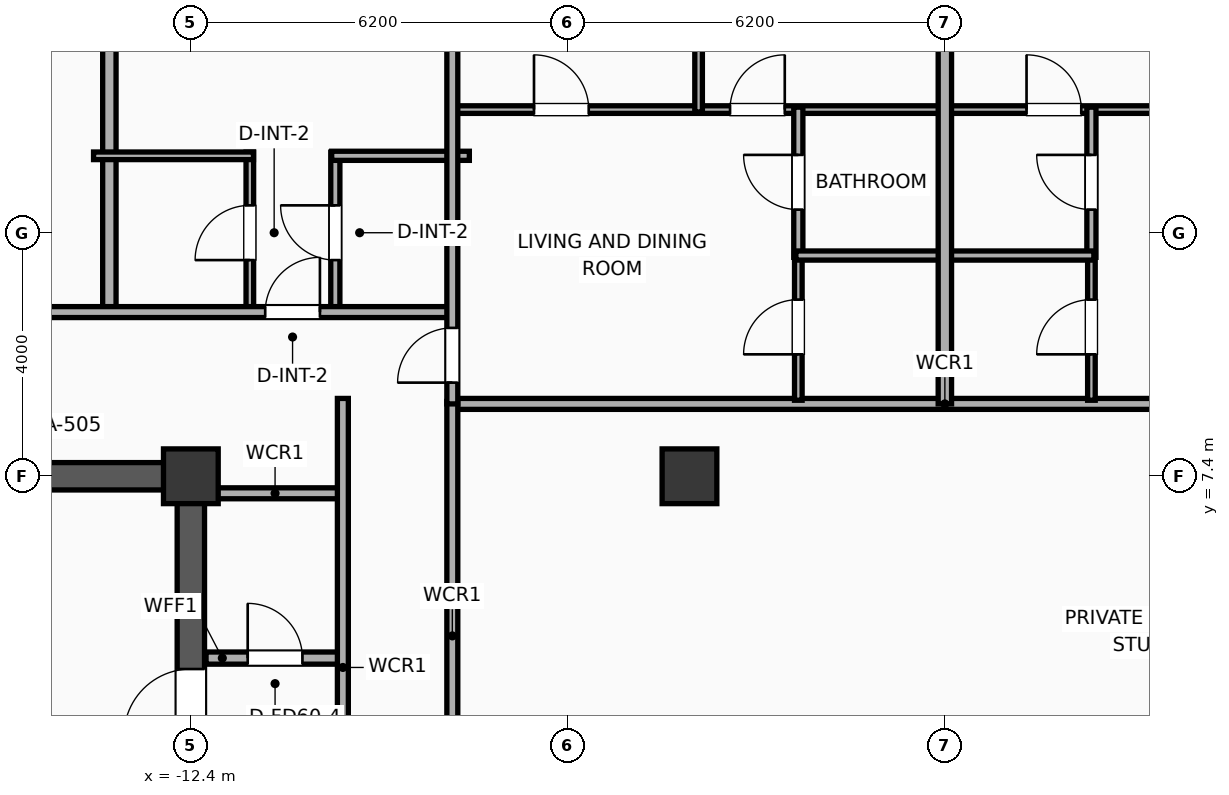
"""IFC4 building model, lengths in metres.
Left out: names, types, materials, properties, quantities, classifications, styles, units other than length and angle.
Written with IfcOpenShell. Run it as: python <this file> out.ifc"""

import sys

from ifc_helpers import new_model, si_unit, direction, frame, frame_2d, origin, origin_2d, place, context, subcontext, project, spatial, rectangle, extrude, element, fill, save


model = new_model("IFC4")
c1 = context("Model", 3, precision=1e-05, world=origin(), true_north=direction((0.0, 1.0)))
c2 = subcontext(c1, "Body", "Model", "MODEL_VIEW")
j1 = project(units=[si_unit("LENGTHUNIT", "METRE"), si_unit("PLANEANGLEUNIT", "RADIAN")], contexts=[c1])
p1 = place(None, origin())
s1 = spatial("IfcSite", under=j1, at=p1, CompositionType="ELEMENT")
p2 = place(p1, origin())
s2 = spatial("IfcBuilding", under=s1, at=p2, CompositionType="ELEMENT")
p3 = place(p2, frame((0.0, 0.0, 144.3)))
s3 = spatial("IfcBuildingStorey", under=s2, at=p3, CompositionType="ELEMENT", Elevation=144.3)
p4 = place(p3, frame((-12.4, 7.4, 0.0), z_axis=(0.0, 0.0, 1.0), x_axis=(1.0, 0.0, 0.0)))
e1 = element("IfcColumn", 1, at=p4, inside=s3, PredefinedType="COLUMN", context=c2, shape_type="SweptSolid", body=[
    extrude(rectangle(XDim=0.9, YDim=0.9, at=origin_2d()), origin(), (0.0, 0.0, 1.0), 3.9),
])
p5 = place(p3, frame((-19.425, 7.4, 0.0), z_axis=(0.0, 0.0, 1.0), x_axis=(1.0, 0.0, 0.0)))
e2 = element("IfcWall", 2, at=p5, inside=s3, PredefinedType="SHEAR", context=c2, shape_type="SweptSolid", body=[
    extrude(rectangle(XDim=7.25, YDim=0.45, at=frame_2d((3.625, 0.0))), origin(), (0.0, 0.0, 1.0), 3.65),
])
p6 = place(p3, frame((-12.4, -7.4, 0.0), z_axis=(0.0, 0.0, 1.0), x_axis=(0.0, 1.0, 0.0)))
e3 = element("IfcWall", 3, at=p6, inside=s3, PredefinedType="SHEAR", context=c2, shape_type="SweptSolid", body=[
    extrude(rectangle(XDim=14.8, YDim=0.45, at=frame_2d((7.4, 0.0))), origin(), (0.0, 0.0, 1.0), 3.65),
])
p7 = place(p6, frame((6.05, 0.0, 0.0)))
e4 = element("IfcOpeningElement", 4, at=p7, cuts=e3, PredefinedType="OPENING", context=c2, shape_type="SweptSolid", body=[
    extrude(rectangle(XDim=1.1, YDim=2.05, at=frame_2d((0.55, 1.025))), frame((0.0, 0.235, 0.0), z_axis=(0.0, -1.0, 0.0), x_axis=(1.0, 0.0, 0.0)), (0.0, 0.0, 1.0), 0.47),
])
p8 = place(p6, frame((10.53, 0.0, 0.0)))
e5 = element("IfcOpeningElement", 5, at=p8, cuts=e3, PredefinedType="OPENING", context=c2, shape_type="SweptSolid", body=[
    extrude(rectangle(XDim=1.1, YDim=2.05, at=frame_2d((0.55, 1.025))), frame((0.0, 0.235, 0.0), z_axis=(0.0, -1.0, 0.0), x_axis=(1.0, 0.0, 0.0)), (0.0, 0.0, 1.0), 0.47),
])
p9 = place(p6, frame((0.85, 0.0, 0.0)))
e6 = element("IfcOpeningElement", 6, at=p9, cuts=e3, PredefinedType="OPENING", context=c2, shape_type="SweptSolid", body=[
    extrude(rectangle(XDim=0.9, YDim=2.05, at=frame_2d((0.45, 1.025))), frame((0.0, 0.235, 0.0), z_axis=(0.0, -1.0, 0.0), x_axis=(1.0, 0.0, 0.0)), (0.0, 0.0, 1.0), 0.47),
])
p10 = place(p6, frame((3.4, 0.0, 0.0)))
e7 = element("IfcOpeningElement", 7, at=p10, cuts=e3, PredefinedType="OPENING", context=c2, shape_type="SweptSolid", body=[
    extrude(rectangle(XDim=0.9, YDim=2.05, at=frame_2d((0.45, 1.025))), frame((0.0, 0.235, 0.0), z_axis=(0.0, -1.0, 0.0), x_axis=(1.0, 0.0, 0.0)), (0.0, 0.0, 1.0), 0.47),
])
p11 = place(p3, frame((-4.2, 7.4, 0.0), z_axis=(0.0, 0.0, 1.0), x_axis=(1.0, 0.0, 0.0)))
e8 = element("IfcColumn", 8, at=p11, inside=s3, PredefinedType="COLUMN", context=c2, shape_type="SweptSolid", body=[
    extrude(rectangle(XDim=0.9, YDim=0.9, at=origin_2d()), origin(), (0.0, 0.0, 1.0), 3.9),
])
p12 = place(p3, frame((-12.15, 4.41, 0.0), z_axis=(0.0, 0.0, 1.0), x_axis=(1.0, 0.0, 0.0)))
e9 = element("IfcWall", 9, at=p12, inside=s3, PredefinedType="PARTITIONING", context=c2, shape_type="SweptSolid", body=[
    extrude(rectangle(XDim=2.27, YDim=0.2, at=frame_2d((1.135, 0.0))), origin(), (0.0, 0.0, 1.0), 3.65),
])
p13 = place(p12, frame((0.685, 0.0, 0.0)))
e10 = element("IfcOpeningElement", 10, at=p13, cuts=e9, PredefinedType="OPENING", context=c2, shape_type="SweptSolid", body=[
    extrude(rectangle(XDim=0.9, YDim=2.05, at=frame_2d((0.45, 1.025))), frame((0.0, 0.11, 0.0), z_axis=(0.0, -1.0, 0.0), x_axis=(1.0, 0.0, 0.0)), (0.0, 0.0, 1.0), 0.22),
])
p14 = place(p3, frame((-12.15, 7.12, 0.0), z_axis=(0.0, 0.0, 1.0), x_axis=(1.0, 0.0, 0.0)))
e11 = element("IfcWall", 11, at=p14, inside=s3, PredefinedType="PARTITIONING", context=c2, shape_type="SweptSolid", body=[
    extrude(rectangle(XDim=2.27, YDim=0.18, at=frame_2d((1.135, 0.0))), origin(), (0.0, 0.0, 1.0), 3.65),
])
p15 = place(p3, frame((-9.9, -8.68, 0.0), z_axis=(0.0, 0.0, 1.0), x_axis=(0.0, 1.0, 0.0)))
e12 = element("IfcWall", 12, at=p15, inside=s3, PredefinedType="PARTITIONING", context=c2, shape_type="SweptSolid", body=[
    extrude(rectangle(XDim=17.36, YDim=0.18, at=frame_2d((8.68, 0.0))), origin(), (0.0, 0.0, 1.0), 3.65),
])
p16 = place(p15, frame((7.262, 0.0, 0.0)))
e13 = element("IfcOpeningElement", 13, at=p16, cuts=e12, PredefinedType="OPENING", context=c2, shape_type="SweptSolid", body=[
    extrude(rectangle(XDim=1.1, YDim=2.05, at=frame_2d((0.55, 1.025))), frame((0.0, 0.1, 0.0), z_axis=(0.0, -1.0, 0.0), x_axis=(1.0, 0.0, 0.0)), (0.0, 0.0, 1.0), 0.2),
])
p17 = place(p3, frame((-8.15, 8.59, 0.0), z_axis=(0.0, 0.0, 1.0), x_axis=(1.0, 0.0, 0.0)))
e14 = element("IfcWall", 14, at=p17, inside=s3, PredefinedType="PARTITIONING", context=c2, shape_type="SweptSolid", body=[
    extrude(rectangle(XDim=16.3, YDim=0.18, at=frame_2d((8.15, 0.0))), origin(), (0.0, 0.0, 1.0), 3.65),
])
p18 = place(p3, frame((-8.1, 0.92, 0.0), z_axis=(0.0, 0.0, 1.0), x_axis=(0.0, 1.0, 0.0)))
e15 = element("IfcWall", 15, at=p18, inside=s3, PredefinedType="PARTITIONING", context=c2, shape_type="SweptSolid", body=[
    extrude(rectangle(XDim=7.71, YDim=0.18, at=frame_2d((3.855, 0.0))), origin(), (0.0, 0.0, 1.0), 3.65),
])
p19 = place(p3, frame((-13.74, 10.02, 0.0), z_axis=(0.0, 0.0, 1.0), x_axis=(0.0, 1.0, 0.0)))
e16 = element("IfcWall", 16, at=p19, inside=s3, PredefinedType="PARTITIONING", context=c2, shape_type="SweptSolid", body=[
    extrude(rectangle(XDim=8.614, YDim=0.22, at=frame_2d((4.307, 0.0))), origin(), (0.0, 0.0, 1.0), 3.65),
])
p20 = place(p3, frame((-11.43, 10.08, 0.0), z_axis=(0.0, 0.0, 1.0), x_axis=(0.0, 1.0, 0.0)))
e17 = element("IfcWall", 17, at=p20, inside=s3, PredefinedType="PARTITIONING", context=c2, shape_type="SweptSolid", body=[
    extrude(rectangle(XDim=2.65, YDim=0.125, at=frame_2d((1.325, 0.0))), origin(), (0.0, 0.0, 1.0), 2.54),
])
p21 = place(p20, frame((0.875, 0.0, 0.0)))
e18 = element("IfcOpeningElement", 18, at=p21, cuts=e17, PredefinedType="OPENING", context=c2, shape_type="SweptSolid", body=[
    extrude(rectangle(XDim=0.9, YDim=2.05, at=frame_2d((0.45, 1.025))), frame((0.0, 0.073, 0.0), z_axis=(0.0, -1.0, 0.0), x_axis=(1.0, 0.0, 0.0)), (0.0, 0.0, 1.0), 0.145),
])
p22 = place(p3, frame((-10.024, 10.08, 0.0), z_axis=(0.0, 0.0, 1.0), x_axis=(0.0, 1.0, 0.0)))
e19 = element("IfcWall", 19, at=p22, inside=s3, PredefinedType="PLUMBINGWALL", context=c2, shape_type="SweptSolid", body=[
    extrude(rectangle(XDim=2.65, YDim=0.15, at=frame_2d((1.325, 0.0))), origin(), (0.0, 0.0, 1.0), 3.65),
])
p23 = place(p22, frame((0.875, 0.0, 0.0)))
e20 = element("IfcOpeningElement", 20, at=p23, cuts=e19, PredefinedType="OPENING", context=c2, shape_type="SweptSolid", body=[
    extrude(rectangle(XDim=0.9, YDim=2.05, at=frame_2d((0.45, 1.025))), frame((0.0, 0.085, 0.0), z_axis=(0.0, -1.0, 0.0), x_axis=(1.0, 0.0, 0.0)), (0.0, 0.0, 1.0), 0.17),
])
p24 = place(p3, frame((-14.0, 12.67, 0.0), z_axis=(0.0, 0.0, 1.0), x_axis=(1.0, 0.0, 0.0)))
e21 = element("IfcWall", 21, at=p24, inside=s3, PredefinedType="PARTITIONING", context=c2, shape_type="SweptSolid", body=[
    extrude(rectangle(XDim=2.63, YDim=0.125, at=frame_2d((1.315, 0.0))), origin(), (0.0, 0.0, 1.0), 3.65),
])
p25 = place(p3, frame((-10.084, 12.67, 0.0), z_axis=(0.0, 0.0, 1.0), x_axis=(1.0, 0.0, 0.0)))
e22 = element("IfcWall", 22, at=p25, inside=s3, PredefinedType="PLUMBINGWALL", context=c2, shape_type="SweptSolid", body=[
    extrude(rectangle(XDim=2.264, YDim=0.15, at=frame_2d((1.132, 0.0))), origin(), (0.0, 0.0, 1.0), 3.65),
])
p26 = place(p3, frame((-19.5, 10.1, 0.0), z_axis=(0.0, 0.0, 1.0), x_axis=(1.0, 0.0, 0.0)))
e23 = element("IfcWall", 23, at=p26, inside=s3, PredefinedType="PARTITIONING", context=c2, shape_type="SweptSolid", body=[
    extrude(rectangle(XDim=11.42, YDim=0.18, at=frame_2d((5.71, 0.0))), origin(), (0.0, 0.0, 1.0), 3.65),
])
p27 = place(p26, frame((3.464, 0.0, 0.0)))
e24 = element("IfcOpeningElement", 24, at=p27, cuts=e23, PredefinedType="OPENING", context=c2, shape_type="SweptSolid", body=[
    extrude(rectangle(XDim=1.15, YDim=2.05, at=frame_2d((0.575, 1.025))), frame((0.0, 0.1, 0.0), z_axis=(0.0, -1.0, 0.0), x_axis=(1.0, 0.0, 0.0)), (0.0, 0.0, 1.0), 0.2),
])
p28 = place(p26, frame((8.323, 0.0, 0.0)))
e25 = element("IfcOpeningElement", 25, at=p28, cuts=e23, PredefinedType="OPENING", context=c2, shape_type="SweptSolid", body=[
    extrude(rectangle(XDim=0.9, YDim=2.05, at=frame_2d((0.45, 1.025))), frame((0.0, 0.1, 0.0), z_axis=(0.0, -1.0, 0.0), x_axis=(1.0, 0.0, 0.0)), (0.0, 0.0, 1.0), 0.2),
])
p29 = place(p3, frame((-8.08, 13.43, 0.0), z_axis=(0.0, 0.0, 1.0), x_axis=(1.0, 0.0, 0.0)))
e26 = element("IfcWall", 26, at=p29, inside=s3, PredefinedType="PARTITIONING", context=c2, shape_type="SweptSolid", body=[
    extrude(rectangle(XDim=8.06, YDim=0.125, at=frame_2d((4.03, 0.0))), origin(), (0.0, 0.0, 1.0), 3.65),
])
p30 = place(p29, frame((1.323, 0.0, 0.0)))
e27 = element("IfcOpeningElement", 27, at=p30, cuts=e26, PredefinedType="OPENING", context=c2, shape_type="SweptSolid", body=[
    extrude(rectangle(XDim=0.9, YDim=2.05, at=frame_2d((0.45, 1.025))), frame((0.0, 0.073, 0.0), z_axis=(0.0, -1.0, 0.0), x_axis=(1.0, 0.0, 0.0)), (0.0, 0.0, 1.0), 0.145),
])
p31 = place(p29, frame((4.547, 0.0, 0.0)))
e28 = element("IfcOpeningElement", 28, at=p31, cuts=e26, PredefinedType="OPENING", context=c2, shape_type="SweptSolid", body=[
    extrude(rectangle(XDim=0.9, YDim=2.05, at=frame_2d((0.45, 1.025))), frame((0.0, 0.073, 0.0), z_axis=(0.0, -1.0, 0.0), x_axis=(1.0, 0.0, 0.0)), (0.0, 0.0, 1.0), 0.145),
])
p32 = place(p3, frame((-2.41, 8.65, 0.0), z_axis=(0.0, 0.0, 1.0), x_axis=(0.0, 1.0, 0.0)))
e29 = element("IfcWall", 29, at=p32, inside=s3, PredefinedType="PARTITIONING", context=c2, shape_type="SweptSolid", body=[
    extrude(rectangle(XDim=2.41, YDim=0.125, at=frame_2d((1.205, 0.0))), origin(), (0.0, 0.0, 1.0), 2.54),
])
p33 = place(p32, frame((0.755, 0.0, 0.0)))
e30 = element("IfcOpeningElement", 30, at=p33, cuts=e29, PredefinedType="OPENING", context=c2, shape_type="SweptSolid", body=[
    extrude(rectangle(XDim=0.9, YDim=2.05, at=frame_2d((0.45, 1.025))), frame((0.0, 0.073, 0.0), z_axis=(0.0, -1.0, 0.0), x_axis=(1.0, 0.0, 0.0)), (0.0, 0.0, 1.0), 0.145),
])
p34 = place(p3, frame((-2.41, 11.0, 0.0), z_axis=(0.0, 0.0, 1.0), x_axis=(0.0, 1.0, 0.0)))
e31 = element("IfcWall", 31, at=p34, inside=s3, PredefinedType="PLUMBINGWALL", context=c2, shape_type="SweptSolid", body=[
    extrude(rectangle(XDim=2.47, YDim=0.15, at=frame_2d((1.235, 0.0))), origin(), (0.0, 0.0, 1.0), 2.54),
])
p35 = place(p34, frame((0.785, 0.0, 0.0)))
e32 = element("IfcOpeningElement", 32, at=p35, cuts=e31, PredefinedType="OPENING", context=c2, shape_type="SweptSolid", body=[
    extrude(rectangle(XDim=0.9, YDim=2.05, at=frame_2d((0.45, 1.025))), frame((0.0, 0.085, 0.0), z_axis=(0.0, -1.0, 0.0), x_axis=(1.0, 0.0, 0.0)), (0.0, 0.0, 1.0), 0.17),
])
p36 = place(p3, frame((-2.45, 11.03, 0.0), z_axis=(0.0, 0.0, 1.0), x_axis=(1.0, 0.0, 0.0)))
e33 = element("IfcWall", 33, at=p36, inside=s3, PredefinedType="PLUMBINGWALL", context=c2, shape_type="SweptSolid", body=[
    extrude(rectangle(XDim=2.43, YDim=0.15, at=frame_2d((1.215, 0.0))), origin(), (0.0, 0.0, 1.0), 3.65),
])
p37 = place(p3, frame((-4.05, 13.39, 0.0), z_axis=(0.0, 0.0, 1.0), x_axis=(0.0, 1.0, 0.0)))
e34 = element("IfcWall", 34, at=p37, inside=s3, PredefinedType="PARTITIONING", context=c2, shape_type="SweptSolid", body=[
    extrude(rectangle(XDim=6.262, YDim=0.125, at=frame_2d((3.131, 0.0))), origin(), (0.0, 0.0, 1.0), 3.65),
])
p38 = place(p3, frame((-8.1, 8.59, 0.0), z_axis=(0.0, 0.0, 1.0), x_axis=(0.0, 1.0, 0.0)))
e35 = element("IfcWall", 35, at=p38, inside=s3, PredefinedType="PARTITIONING", context=c2, shape_type="SweptSolid", body=[
    extrude(rectangle(XDim=10.636, YDim=0.18, at=frame_2d((5.318, 0.0))), origin(), (0.0, 0.0, 1.0), 3.65),
])
p39 = place(p38, frame((0.35, 0.0, 0.0)))
e36 = element("IfcOpeningElement", 36, at=p39, cuts=e35, PredefinedType="OPENING", context=c2, shape_type="SweptSolid", body=[
    extrude(rectangle(XDim=0.9, YDim=2.05, at=frame_2d((0.45, 1.025))), frame((0.0, 0.1, 0.0), z_axis=(0.0, -1.0, 0.0), x_axis=(1.0, 0.0, 0.0)), (0.0, 0.0, 1.0), 0.2),
])
p40 = place(p3, frame((0.02, 13.43, 0.0), z_axis=(0.0, 0.0, 1.0), x_axis=(1.0, 0.0, 0.0)))
e37 = element("IfcWall", 37, at=p40, inside=s3, PredefinedType="PARTITIONING", context=c2, shape_type="SweptSolid", body=[
    extrude(rectangle(XDim=8.06, YDim=0.125, at=frame_2d((4.03, 0.0))), origin(), (0.0, 0.0, 1.0), 3.65),
])
p41 = place(p40, frame((1.323, 0.0, 0.0)))
e38 = element("IfcOpeningElement", 38, at=p41, cuts=e37, PredefinedType="OPENING", context=c2, shape_type="SweptSolid", body=[
    extrude(rectangle(XDim=0.9, YDim=2.05, at=frame_2d((0.45, 1.025))), frame((0.0, 0.073, 0.0), z_axis=(0.0, -1.0, 0.0), x_axis=(1.0, 0.0, 0.0)), (0.0, 0.0, 1.0), 0.145),
])
p42 = place(p40, frame((5.837, 0.0, 0.0)))
e39 = element("IfcOpeningElement", 39, at=p42, cuts=e37, PredefinedType="OPENING", context=c2, shape_type="SweptSolid", body=[
    extrude(rectangle(XDim=0.9, YDim=2.05, at=frame_2d((0.45, 1.025))), frame((0.0, 0.073, 0.0), z_axis=(0.0, -1.0, 0.0), x_axis=(1.0, 0.0, 0.0)), (0.0, 0.0, 1.0), 0.145),
])
p43 = place(p3, frame((2.41, 8.65, 0.0), z_axis=(0.0, 0.0, 1.0), x_axis=(0.0, 1.0, 0.0)))
e40 = element("IfcWall", 40, at=p43, inside=s3, PredefinedType="PARTITIONING", context=c2, shape_type="SweptSolid", body=[
    extrude(rectangle(XDim=2.41, YDim=0.125, at=frame_2d((1.205, 0.0))), origin(), (0.0, 0.0, 1.0), 3.65),
])
p44 = place(p43, frame((0.755, 0.0, 0.0)))
e41 = element("IfcOpeningElement", 41, at=p44, cuts=e40, PredefinedType="OPENING", context=c2, shape_type="SweptSolid", body=[
    extrude(rectangle(XDim=0.9, YDim=2.05, at=frame_2d((0.45, 1.025))), frame((0.0, 0.073, 0.0), z_axis=(0.0, -1.0, 0.0), x_axis=(1.0, 0.0, 0.0)), (0.0, 0.0, 1.0), 0.145),
])
p45 = place(p3, frame((2.41, 11.0, 0.0), z_axis=(0.0, 0.0, 1.0), x_axis=(0.0, 1.0, 0.0)))
e42 = element("IfcWall", 42, at=p45, inside=s3, PredefinedType="PLUMBINGWALL", context=c2, shape_type="SweptSolid", body=[
    extrude(rectangle(XDim=2.47, YDim=0.15, at=frame_2d((1.235, 0.0))), origin(), (0.0, 0.0, 1.0), 3.65),
])
p46 = place(p45, frame((0.785, 0.0, 0.0)))
e43 = element("IfcOpeningElement", 43, at=p46, cuts=e42, PredefinedType="OPENING", context=c2, shape_type="SweptSolid", body=[
    extrude(rectangle(XDim=0.9, YDim=2.05, at=frame_2d((0.45, 1.025))), frame((0.0, 0.085, 0.0), z_axis=(0.0, -1.0, 0.0), x_axis=(1.0, 0.0, 0.0)), (0.0, 0.0, 1.0), 0.17),
])
p47 = place(p3, frame((0.02, 11.03, 0.0), z_axis=(0.0, 0.0, 1.0), x_axis=(1.0, 0.0, 0.0)))
e44 = element("IfcWall", 44, at=p47, inside=s3, PredefinedType="PLUMBINGWALL", context=c2, shape_type="SweptSolid", body=[
    extrude(rectangle(XDim=2.43, YDim=0.15, at=frame_2d((1.215, 0.0))), origin(), (0.0, 0.0, 1.0), 3.65),
])
p48 = place(p3, frame((0.0, 8.59, 0.0), z_axis=(0.0, 0.0, 1.0), x_axis=(0.0, 1.0, 0.0)))
e45 = element("IfcWall", 45, at=p48, inside=s3, PredefinedType="PARTITIONING", context=c2, shape_type="SweptSolid", body=[
    extrude(rectangle(XDim=11.488, YDim=0.22, at=frame_2d((5.744, 0.0))), origin(), (0.0, 0.0, 1.0), 2.54),
])
p49 = place(p13, origin())
e46 = element("IfcDoor", 46, at=p49, inside=s3, OperationType="SINGLE_SWING_LEFT", PredefinedType="DOOR", context=c2, shape_type="SweptSolid", body=[
    extrude(rectangle(XDim=0.9, YDim=2.05, at=frame_2d((0.45, 1.025))), frame((0.0, 0.025, 0.0), z_axis=(0.0, -1.0, 0.0), x_axis=(1.0, 0.0, 0.0)), (0.0, 0.0, 1.0), 0.05),
])
fill(e10, e46)
p50 = place(p21, origin())
e47 = element("IfcDoor", 47, at=p50, inside=s3, OperationType="SINGLE_SWING_LEFT", PredefinedType="DOOR", context=c2, shape_type="SweptSolid", body=[
    extrude(rectangle(XDim=0.9, YDim=2.05, at=frame_2d((0.45, 1.025))), frame((0.0, 0.025, 0.0), z_axis=(0.0, -1.0, 0.0), x_axis=(1.0, 0.0, 0.0)), (0.0, 0.0, 1.0), 0.05),
])
fill(e18, e47)
p51 = place(p23, origin())
e48 = element("IfcDoor", 48, at=p51, inside=s3, OperationType="SINGLE_SWING_RIGHT", PredefinedType="DOOR", context=c2, shape_type="SweptSolid", body=[
    extrude(rectangle(XDim=0.9, YDim=2.05, at=frame_2d((0.45, 1.025))), frame((0.0, 0.025, 0.0), z_axis=(0.0, -1.0, 0.0), x_axis=(1.0, 0.0, 0.0)), (0.0, 0.0, 1.0), 0.05),
])
fill(e20, e48)
p52 = place(p28, origin())
e49 = element("IfcDoor", 49, at=p52, inside=s3, OperationType="SINGLE_SWING_RIGHT", PredefinedType="DOOR", context=c2, shape_type="SweptSolid", body=[
    extrude(rectangle(XDim=0.9, YDim=2.05, at=frame_2d((0.45, 1.025))), frame((0.0, 0.025, 0.0), z_axis=(0.0, -1.0, 0.0), x_axis=(1.0, 0.0, 0.0)), (0.0, 0.0, 1.0), 0.05),
])
fill(e25, e49)
p53 = place(p30, origin())
e50 = element("IfcDoor", 50, at=p53, inside=s3, OperationType="SINGLE_SWING_LEFT", PredefinedType="DOOR", context=c2, shape_type="SweptSolid", body=[
    extrude(rectangle(XDim=0.9, YDim=2.05, at=frame_2d((0.45, 1.025))), frame((0.0, 0.025, 0.0), z_axis=(0.0, -1.0, 0.0), x_axis=(1.0, 0.0, 0.0)), (0.0, 0.0, 1.0), 0.05),
])
fill(e27, e50)
p54 = place(p31, origin())
e51 = element("IfcDoor", 51, at=p54, inside=s3, OperationType="SINGLE_SWING_RIGHT", PredefinedType="DOOR", context=c2, shape_type="SweptSolid", body=[
    extrude(rectangle(XDim=0.9, YDim=2.05, at=frame_2d((0.45, 1.025))), frame((0.0, 0.025, 0.0), z_axis=(0.0, -1.0, 0.0), x_axis=(1.0, 0.0, 0.0)), (0.0, 0.0, 1.0), 0.05),
])
fill(e28, e51)
p55 = place(p33, origin())
e52 = element("IfcDoor", 52, at=p55, inside=s3, OperationType="SINGLE_SWING_LEFT", PredefinedType="DOOR", context=c2, shape_type="SweptSolid", body=[
    extrude(rectangle(XDim=0.9, YDim=2.05, at=frame_2d((0.45, 1.025))), frame((0.0, 0.025, 0.0), z_axis=(0.0, -1.0, 0.0), x_axis=(1.0, 0.0, 0.0)), (0.0, 0.0, 1.0), 0.05),
])
fill(e30, e52)
p56 = place(p35, origin())
e53 = element("IfcDoor", 53, at=p56, inside=s3, OperationType="SINGLE_SWING_RIGHT", PredefinedType="DOOR", context=c2, shape_type="SweptSolid", body=[
    extrude(rectangle(XDim=0.9, YDim=2.05, at=frame_2d((0.45, 1.025))), frame((0.0, 0.025, 0.0), z_axis=(0.0, -1.0, 0.0), x_axis=(1.0, 0.0, 0.0)), (0.0, 0.0, 1.0), 0.05),
])
fill(e32, e53)
p57 = place(p39, origin())
e54 = element("IfcDoor", 54, at=p57, inside=s3, OperationType="SINGLE_SWING_LEFT", PredefinedType="DOOR", context=c2, shape_type="SweptSolid", body=[
    extrude(rectangle(XDim=0.9, YDim=2.05, at=frame_2d((0.45, 1.025))), frame((0.0, 0.025, 0.0), z_axis=(0.0, -1.0, 0.0), x_axis=(1.0, 0.0, 0.0)), (0.0, 0.0, 1.0), 0.05),
])
fill(e36, e54)
p58 = place(p41, origin())
e55 = element("IfcDoor", 55, at=p58, inside=s3, OperationType="SINGLE_SWING_LEFT", PredefinedType="DOOR", context=c2, shape_type="SweptSolid", body=[
    extrude(rectangle(XDim=0.9, YDim=2.05, at=frame_2d((0.45, 1.025))), frame((0.0, 0.025, 0.0), z_axis=(0.0, -1.0, 0.0), x_axis=(1.0, 0.0, 0.0)), (0.0, 0.0, 1.0), 0.05),
])
fill(e38, e55)
p59 = place(p44, origin())
e56 = element("IfcDoor", 56, at=p59, inside=s3, OperationType="SINGLE_SWING_LEFT", PredefinedType="DOOR", context=c2, shape_type="SweptSolid", body=[
    extrude(rectangle(XDim=0.9, YDim=2.05, at=frame_2d((0.45, 1.025))), frame((0.0, 0.025, 0.0), z_axis=(0.0, -1.0, 0.0), x_axis=(1.0, 0.0, 0.0)), (0.0, 0.0, 1.0), 0.05),
])
fill(e41, e56)
p60 = place(p46, origin())
e57 = element("IfcDoor", 57, at=p60, inside=s3, OperationType="SINGLE_SWING_RIGHT", PredefinedType="DOOR", context=c2, shape_type="SweptSolid", body=[
    extrude(rectangle(XDim=0.9, YDim=2.05, at=frame_2d((0.45, 1.025))), frame((0.0, 0.025, 0.0), z_axis=(0.0, -1.0, 0.0), x_axis=(1.0, 0.0, 0.0)), (0.0, 0.0, 1.0), 0.05),
])
fill(e43, e57)
p61 = place(p8, origin())
e58 = element("IfcDoor", 58, at=p61, inside=s3, OperationType="SINGLE_SWING_LEFT", PredefinedType="DOOR", context=c2, shape_type="SweptSolid", body=[
    extrude(rectangle(XDim=1.1, YDim=2.05, at=frame_2d((0.55, 1.025))), frame((0.0, 0.025, 0.0), z_axis=(0.0, -1.0, 0.0), x_axis=(1.0, 0.0, 0.0)), (0.0, 0.0, 1.0), 0.05),
])
fill(e5, e58)
save(model, sys.argv[1])
